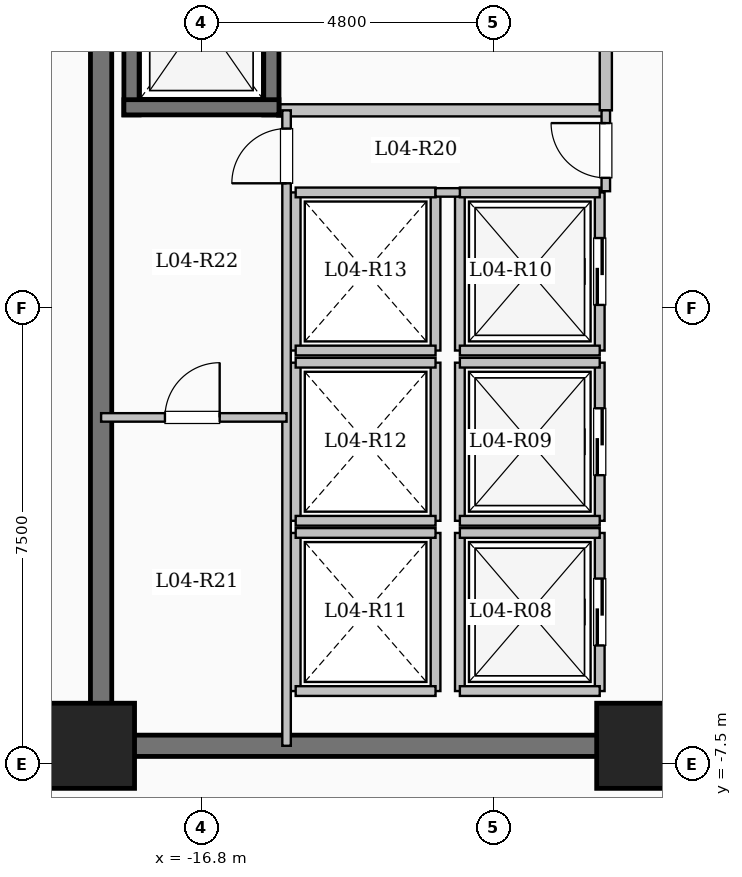
"""IFC4 building model, lengths in metres.
Left out: names, types, materials, properties, quantities, classifications, styles, units other than length and angle.
Written with IfcOpenShell. Run it as: python <this file> out.ifc"""

import sys

from ifc_helpers import new_model, si_unit, direction, frame, frame_2d, origin, origin_2d, place, context, subcontext, project, spatial, rectangle, extrude, element, fill, save


model = new_model("IFC4")
c1 = context("Model", 3, precision=1e-05, world=origin(), true_north=direction((0.0, 1.0)))
c2 = subcontext(c1, "Body", "Model", "MODEL_VIEW")
j1 = project(units=[si_unit("LENGTHUNIT", "METRE"), si_unit("PLANEANGLEUNIT", "RADIAN")], contexts=[c1])
p1 = place(None, origin())
s1 = spatial("IfcSite", under=j1, at=p1, CompositionType="ELEMENT")
p2 = place(p1, origin())
s2 = spatial("IfcBuilding", under=s1, at=p2, CompositionType="ELEMENT")
p3 = place(p2, frame((0.0, 0.0, 18.9)))
s3 = spatial("IfcBuildingStorey", under=s2, at=p3, CompositionType="ELEMENT", Elevation=18.9)
for number, where, z_axis, x_axis in (
    (1, (-9.6, -7.2, 0.0), (0.0, 0.0, 1.0), (1.0, 0.0, 0.0)),
    (2, (-18.6, -7.2, 0.0), (0.0, 0.0, 1.0), (1.0, 0.0, 0.0)),
):
    element("IfcColumn", number, at=place(p3, frame(where, z_axis=z_axis, x_axis=x_axis)), inside=s3, PredefinedType="COLUMN", context=c2, shape_type="SweptSolid", body=[
        extrude(rectangle(XDim=1.4, YDim=1.4, at=origin_2d()), origin(), (0.0, 0.0, 1.0), 5.1),
    ])
p4 = place(p3, frame((-15.55, 3.25, 0.0), z_axis=(0.0, 0.0, 1.0), x_axis=(1.0, 0.0, 0.0)))
e3 = element("IfcWall", 3, at=p4, inside=s3, PredefinedType="SOLIDWALL", context=c2, shape_type="SweptSolid", body=[
    extrude(rectangle(XDim=5.4, YDim=0.2, at=frame_2d((2.7, 0.0))), origin(), (0.0, 0.0, 1.0), 4.85),
])
p5 = place(p3, frame((-10.15, 3.25, 0.0), z_axis=(0.0, 0.0, 1.0), x_axis=(0.0, 1.0, 0.0)))
e4 = element("IfcWall", 4, at=p5, inside=s3, PredefinedType="SOLIDWALL", context=c2, shape_type="SweptSolid", body=[
    extrude(rectangle(XDim=3.25, YDim=0.2, at=frame_2d((1.625, 0.0))), origin(), (0.0, 0.0, 1.0), 4.85),
])
p6 = place(p5, frame((1.1, 0.0, 0.0)))
e5 = element("IfcOpeningElement", 5, at=p6, cuts=e4, PredefinedType="OPENING", context=c2, shape_type="SweptSolid", body=[
    extrude(rectangle(XDim=1.02, YDim=2.15, at=frame_2d((0.51, 1.075))), frame((0.0, 0.11, 0.0), z_axis=(0.0, -1.0, 0.0), x_axis=(1.0, 0.0, 0.0)), (0.0, 0.0, 1.0), 0.22),
])
p7 = place(p3, frame((-17.95, 3.175, 0.0), z_axis=(0.0, 0.0, 1.0), x_axis=(0.0, 1.0, 0.0)))
e6 = element("IfcWall", 6, at=p7, inside=s3, PredefinedType="SHEAR", context=c2, shape_type="SweptSolid", body=[
    extrude(rectangle(XDim=3.25, YDim=0.25, at=frame_2d((1.625, 0.0))), origin(), (0.0, 0.0, 1.0), 5.1),
])
p8 = place(p3, frame((-15.65, 3.175, 0.0), z_axis=(0.0, 0.0, 1.0), x_axis=(0.0, 1.0, 0.0)))
e7 = element("IfcWall", 7, at=p8, inside=s3, PredefinedType="SHEAR", context=c2, shape_type="SweptSolid", body=[
    extrude(rectangle(XDim=3.25, YDim=0.25, at=frame_2d((1.625, 0.0))), origin(), (0.0, 0.0, 1.0), 5.1),
])
p9 = place(p8, frame((1.075, 0.0, 0.0)))
e8 = element("IfcOpeningElement", 8, at=p9, cuts=e7, PredefinedType="OPENING", context=c2, shape_type="SweptSolid", body=[
    extrude(rectangle(XDim=1.1, YDim=2.15, at=frame_2d((0.55, 1.075))), frame((0.0, 0.135, 0.0), z_axis=(0.0, -1.0, 0.0), x_axis=(1.0, 0.0, 0.0)), (0.0, 0.0, 1.0), 0.27),
])
p10 = place(p3, frame((-18.075, 3.3, 0.0), z_axis=(0.0, 0.0, 1.0), x_axis=(1.0, 0.0, 0.0)))
e9 = element("IfcWall", 9, at=p10, inside=s3, PredefinedType="SHEAR", context=c2, shape_type="SweptSolid", body=[
    extrude(rectangle(XDim=2.55, YDim=0.25, at=frame_2d((1.275, 0.0))), origin(), (0.0, 0.0, 1.0), 5.1),
])
p11 = place(p3, frame((-12.55, -6.3, 0.0), z_axis=(0.0, 0.0, 1.0), x_axis=(0.0, 1.0, 0.0)))
e10 = element("IfcWall", 10, at=p11, inside=s3, PredefinedType="SOLIDWALL", context=c2, shape_type="SweptSolid", body=[
    extrude(rectangle(XDim=2.6, YDim=0.16, at=frame_2d((1.3, 0.0))), origin(), (0.0, 0.0, 1.0), 4.85),
])
p12 = place(p3, frame((-10.25, -6.3, 0.0), z_axis=(0.0, 0.0, 1.0), x_axis=(0.0, 1.0, 0.0)))
e11 = element("IfcWall", 11, at=p12, inside=s3, PredefinedType="SOLIDWALL", context=c2, shape_type="SweptSolid", body=[
    extrude(rectangle(XDim=2.6, YDim=0.16, at=frame_2d((1.3, 0.0))), origin(), (0.0, 0.0, 1.0), 4.85),
])
p13 = place(p12, frame((0.75, 0.0, 0.0)))
e12 = element("IfcOpeningElement", 12, at=p13, cuts=e11, PredefinedType="OPENING", context=c2, shape_type="SweptSolid", body=[
    extrude(rectangle(XDim=1.1, YDim=2.15, at=frame_2d((0.55, 1.075))), frame((0.0, 0.09, 0.0), z_axis=(0.0, -1.0, 0.0), x_axis=(1.0, 0.0, 0.0)), (0.0, 0.0, 1.0), 0.18),
])
for number, where, z_axis, x_axis in (
    (13, (-12.55, -6.3, 0.0), (0.0, 0.0, 1.0), (1.0, 0.0, 0.0)),
    (14, (-12.55, -3.7, 0.0), (0.0, 0.0, 1.0), (1.0, 0.0, 0.0)),
):
    element("IfcWall", number, at=place(p3, frame(where, z_axis=z_axis, x_axis=x_axis)), inside=s3, PredefinedType="SOLIDWALL", context=c2, shape_type="SweptSolid", body=[
        extrude(rectangle(XDim=2.3, YDim=0.16, at=frame_2d((1.15, 0.0))), origin(), (0.0, 0.0, 1.0), 4.85),
    ])
p14 = place(p3, frame((-12.55, -3.5, 0.0), z_axis=(0.0, 0.0, 1.0), x_axis=(0.0, 1.0, 0.0)))
e15 = element("IfcWall", 15, at=p14, inside=s3, PredefinedType="SOLIDWALL", context=c2, shape_type="SweptSolid", body=[
    extrude(rectangle(XDim=2.6, YDim=0.16, at=frame_2d((1.3, 0.0))), origin(), (0.0, 0.0, 1.0), 4.85),
])
p15 = place(p3, frame((-10.25, -3.5, 0.0), z_axis=(0.0, 0.0, 1.0), x_axis=(0.0, 1.0, 0.0)))
e16 = element("IfcWall", 16, at=p15, inside=s3, PredefinedType="SOLIDWALL", context=c2, shape_type="SweptSolid", body=[
    extrude(rectangle(XDim=2.6, YDim=0.16, at=frame_2d((1.3, 0.0))), origin(), (0.0, 0.0, 1.0), 4.85),
])
p16 = place(p15, frame((0.75, 0.0, 0.0)))
e17 = element("IfcOpeningElement", 17, at=p16, cuts=e16, PredefinedType="OPENING", context=c2, shape_type="SweptSolid", body=[
    extrude(rectangle(XDim=1.1, YDim=2.15, at=frame_2d((0.55, 1.075))), frame((0.0, 0.09, 0.0), z_axis=(0.0, -1.0, 0.0), x_axis=(1.0, 0.0, 0.0)), (0.0, 0.0, 1.0), 0.18),
])
for number, where, z_axis, x_axis in (
    (18, (-12.55, -3.5, 0.0), (0.0, 0.0, 1.0), (1.0, 0.0, 0.0)),
    (19, (-12.55, -0.9, 0.0), (0.0, 0.0, 1.0), (1.0, 0.0, 0.0)),
):
    element("IfcWall", number, at=place(p3, frame(where, z_axis=z_axis, x_axis=x_axis)), inside=s3, PredefinedType="SOLIDWALL", context=c2, shape_type="SweptSolid", body=[
        extrude(rectangle(XDim=2.3, YDim=0.16, at=frame_2d((1.15, 0.0))), origin(), (0.0, 0.0, 1.0), 4.85),
    ])
p17 = place(p3, frame((-12.55, -0.7, 0.0), z_axis=(0.0, 0.0, 1.0), x_axis=(0.0, 1.0, 0.0)))
e20 = element("IfcWall", 20, at=p17, inside=s3, PredefinedType="SOLIDWALL", context=c2, shape_type="SweptSolid", body=[
    extrude(rectangle(XDim=2.6, YDim=0.16, at=frame_2d((1.3, 0.0))), origin(), (0.0, 0.0, 1.0), 4.85),
])
p18 = place(p3, frame((-10.25, -0.7, 0.0), z_axis=(0.0, 0.0, 1.0), x_axis=(0.0, 1.0, 0.0)))
e21 = element("IfcWall", 21, at=p18, inside=s3, PredefinedType="SOLIDWALL", context=c2, shape_type="SweptSolid", body=[
    extrude(rectangle(XDim=2.6, YDim=0.16, at=frame_2d((1.3, 0.0))), origin(), (0.0, 0.0, 1.0), 4.85),
])
p19 = place(p18, frame((0.75, 0.0, 0.0)))
e22 = element("IfcOpeningElement", 22, at=p19, cuts=e21, PredefinedType="OPENING", context=c2, shape_type="SweptSolid", body=[
    extrude(rectangle(XDim=1.1, YDim=2.15, at=frame_2d((0.55, 1.075))), frame((0.0, 0.09, 0.0), z_axis=(0.0, -1.0, 0.0), x_axis=(1.0, 0.0, 0.0)), (0.0, 0.0, 1.0), 0.18),
])
for number, where, z_axis, x_axis in (
    (23, (-12.55, -0.7, 0.0), (0.0, 0.0, 1.0), (1.0, 0.0, 0.0)),
    (24, (-12.55, 1.9, 0.0), (0.0, 0.0, 1.0), (1.0, 0.0, 0.0)),
):
    element("IfcWall", number, at=place(p3, frame(where, z_axis=z_axis, x_axis=x_axis)), inside=s3, PredefinedType="SOLIDWALL", context=c2, shape_type="SweptSolid", body=[
        extrude(rectangle(XDim=2.3, YDim=0.16, at=frame_2d((1.15, 0.0))), origin(), (0.0, 0.0, 1.0), 4.85),
    ])
for number, where, z_axis, x_axis in (
    (25, (-15.25, -6.3, 0.0), (0.0, 0.0, 1.0), (0.0, 1.0, 0.0)),
    (26, (-12.95, -6.3, 0.0), (0.0, 0.0, 1.0), (0.0, 1.0, 0.0)),
):
    element("IfcWall", number, at=place(p3, frame(where, z_axis=z_axis, x_axis=x_axis)), inside=s3, PredefinedType="SOLIDWALL", context=c2, shape_type="SweptSolid", body=[
        extrude(rectangle(XDim=2.6, YDim=0.16, at=frame_2d((1.3, 0.0))), origin(), (0.0, 0.0, 1.0), 4.85),
    ])
for number, where, z_axis, x_axis in (
    (27, (-15.25, -6.3, 0.0), (0.0, 0.0, 1.0), (1.0, 0.0, 0.0)),
    (28, (-15.25, -3.7, 0.0), (0.0, 0.0, 1.0), (1.0, 0.0, 0.0)),
):
    element("IfcWall", number, at=place(p3, frame(where, z_axis=z_axis, x_axis=x_axis)), inside=s3, PredefinedType="SOLIDWALL", context=c2, shape_type="SweptSolid", body=[
        extrude(rectangle(XDim=2.3, YDim=0.16, at=frame_2d((1.15, 0.0))), origin(), (0.0, 0.0, 1.0), 4.85),
    ])
for number, where, z_axis, x_axis in (
    (29, (-15.25, -3.5, 0.0), (0.0, 0.0, 1.0), (0.0, 1.0, 0.0)),
    (30, (-12.95, -3.5, 0.0), (0.0, 0.0, 1.0), (0.0, 1.0, 0.0)),
):
    element("IfcWall", number, at=place(p3, frame(where, z_axis=z_axis, x_axis=x_axis)), inside=s3, PredefinedType="SOLIDWALL", context=c2, shape_type="SweptSolid", body=[
        extrude(rectangle(XDim=2.6, YDim=0.16, at=frame_2d((1.3, 0.0))), origin(), (0.0, 0.0, 1.0), 4.85),
    ])
for number, where, z_axis, x_axis in (
    (31, (-15.25, -3.5, 0.0), (0.0, 0.0, 1.0), (1.0, 0.0, 0.0)),
    (32, (-15.25, -0.9, 0.0), (0.0, 0.0, 1.0), (1.0, 0.0, 0.0)),
):
    element("IfcWall", number, at=place(p3, frame(where, z_axis=z_axis, x_axis=x_axis)), inside=s3, PredefinedType="SOLIDWALL", context=c2, shape_type="SweptSolid", body=[
        extrude(rectangle(XDim=2.3, YDim=0.16, at=frame_2d((1.15, 0.0))), origin(), (0.0, 0.0, 1.0), 4.85),
    ])
for number, where, z_axis, x_axis in (
    (33, (-15.25, -0.7, 0.0), (0.0, 0.0, 1.0), (0.0, 1.0, 0.0)),
    (34, (-12.95, -0.7, 0.0), (0.0, 0.0, 1.0), (0.0, 1.0, 0.0)),
):
    element("IfcWall", number, at=place(p3, frame(where, z_axis=z_axis, x_axis=x_axis)), inside=s3, PredefinedType="SOLIDWALL", context=c2, shape_type="SweptSolid", body=[
        extrude(rectangle(XDim=2.6, YDim=0.16, at=frame_2d((1.3, 0.0))), origin(), (0.0, 0.0, 1.0), 4.85),
    ])
for number, where, z_axis, x_axis in (
    (35, (-15.25, -0.7, 0.0), (0.0, 0.0, 1.0), (1.0, 0.0, 0.0)),
    (36, (-15.25, 1.9, 0.0), (0.0, 0.0, 1.0), (1.0, 0.0, 0.0)),
):
    element("IfcWall", number, at=place(p3, frame(where, z_axis=z_axis, x_axis=x_axis)), inside=s3, PredefinedType="SOLIDWALL", context=c2, shape_type="SweptSolid", body=[
        extrude(rectangle(XDim=2.3, YDim=0.16, at=frame_2d((1.15, 0.0))), origin(), (0.0, 0.0, 1.0), 4.85),
    ])
p20 = place(p3, frame((-18.45, -7.375, 0.0), z_axis=(0.0, 0.0, 1.0), x_axis=(0.0, 1.0, 0.0)))
e37 = element("IfcWall", 37, at=p20, inside=s3, PredefinedType="SHEAR", context=c2, shape_type="SweptSolid", body=[
    extrude(rectangle(XDim=14.05, YDim=0.35, at=frame_2d((7.025, 0.0))), origin(), (0.0, 0.0, 1.0), 5.1),
])
p21 = place(p3, frame((-18.625, -7.2, 0.0), z_axis=(0.0, 0.0, 1.0), x_axis=(1.0, 0.0, 0.0)))
e38 = element("IfcWall", 38, at=p21, inside=s3, PredefinedType="SHEAR", context=c2, shape_type="SweptSolid", body=[
    extrude(rectangle(XDim=8.55, YDim=0.35, at=frame_2d((4.275, 0.0))), origin(), (0.0, 0.0, 1.0), 5.1),
])
p22 = place(p3, frame((-12.95, 1.9, 0.0), z_axis=(0.0, 0.0, 1.0), x_axis=(1.0, 0.0, 0.0)))
e39 = element("IfcWall", 39, at=p22, inside=s3, PredefinedType="PARTITIONING", context=c2, shape_type="SweptSolid", body=[
    extrude(rectangle(XDim=0.4, YDim=0.14, at=frame_2d((0.2, 0.0))), origin(), (0.0, 0.0, 1.0), 4.85),
])
p23 = place(p3, frame((-10.15, 1.92, 0.0), z_axis=(0.0, 0.0, 1.0), x_axis=(0.0, 1.0, 0.0)))
e40 = element("IfcWall", 40, at=p23, inside=s3, PredefinedType="PARTITIONING", context=c2, shape_type="SweptSolid", body=[
    extrude(rectangle(XDim=1.33, YDim=0.14, at=frame_2d((0.665, 0.0))), origin(), (0.0, 0.0, 1.0), 4.85),
])
p24 = place(p23, frame((0.22, 0.0, 0.0)))
e41 = element("IfcOpeningElement", 41, at=p24, cuts=e40, PredefinedType="OPENING", context=c2, shape_type="SweptSolid", body=[
    extrude(rectangle(XDim=0.9, YDim=2.08, at=frame_2d((0.45, 1.04))), frame((0.0, 0.08, 0.0), z_axis=(0.0, -1.0, 0.0), x_axis=(1.0, 0.0, 0.0)), (0.0, 0.0, 1.0), 0.16),
])
p25 = place(p3, frame((-15.4, -7.2, 0.0), z_axis=(0.0, 0.0, 1.0), x_axis=(0.0, 1.0, 0.0)))
e42 = element("IfcWall", 42, at=p25, inside=s3, PredefinedType="PARTITIONING", context=c2, shape_type="SweptSolid", body=[
    extrude(rectangle(XDim=10.45, YDim=0.14, at=frame_2d((5.225, 0.0))), origin(), (0.0, 0.0, 1.0), 4.85),
])
p26 = place(p25, frame((9.25, 0.0, 0.0)))
e43 = element("IfcOpeningElement", 43, at=p26, cuts=e42, PredefinedType="OPENING", context=c2, shape_type="SweptSolid", body=[
    extrude(rectangle(XDim=0.9, YDim=2.08, at=frame_2d((0.45, 1.04))), frame((0.0, 0.08, 0.0), z_axis=(0.0, -1.0, 0.0), x_axis=(1.0, 0.0, 0.0)), (0.0, 0.0, 1.0), 0.16),
])
p27 = place(p3, frame((-18.45, -1.8, 0.0), z_axis=(0.0, 0.0, 1.0), x_axis=(1.0, 0.0, 0.0)))
e44 = element("IfcWall", 44, at=p27, inside=s3, PredefinedType="PARTITIONING", context=c2, shape_type="SweptSolid", body=[
    extrude(rectangle(XDim=3.05, YDim=0.14, at=frame_2d((1.525, 0.0))), origin(), (0.0, 0.0, 1.0), 4.85),
])
p28 = place(p27, frame((1.05, 0.0, 0.0)))
e45 = element("IfcOpeningElement", 45, at=p28, cuts=e44, PredefinedType="OPENING", context=c2, shape_type="SweptSolid", body=[
    extrude(rectangle(XDim=0.9, YDim=2.08, at=frame_2d((0.45, 1.04))), frame((0.0, 0.08, 0.0), z_axis=(0.0, -1.0, 0.0), x_axis=(1.0, 0.0, 0.0)), (0.0, 0.0, 1.0), 0.16),
])
p29 = place(p3, frame((-28.88, -7.25, 0.0), z_axis=(0.0, 0.0, 1.0), x_axis=(1.0, 0.0, 0.0)))
e46 = element("IfcWall", 46, at=p29, inside=s3, PredefinedType="PARTITIONING", context=c2, shape_type="SweptSolid", body=[
    extrude(rectangle(XDim=10.43, YDim=0.15, at=frame_2d((5.215, 0.0))), origin(), (0.0, 0.0, 1.0), 4.85),
])
p30 = place(p29, frame((2.5, 0.0, 0.0)))
e47 = element("IfcOpeningElement", 47, at=p30, cuts=e46, PredefinedType="OPENING", context=c2, shape_type="SweptSolid", body=[
    extrude(rectangle(XDim=1.08, YDim=2.15, at=frame_2d((0.54, 1.075))), frame((0.0, 0.085, 0.0), z_axis=(0.0, -1.0, 0.0), x_axis=(1.0, 0.0, 0.0)), (0.0, 0.0, 1.0), 0.17),
])
p31 = place(p13, origin())
e48 = element("IfcDoor", 48, at=p31, inside=s3, OperationType="SLIDING_TO_LEFT", PredefinedType="DOOR", context=c2, shape_type="SweptSolid", body=[
    extrude(rectangle(XDim=1.1, YDim=2.15, at=frame_2d((0.55, 1.075))), frame((0.0, 0.025, 0.0), z_axis=(0.0, -1.0, 0.0), x_axis=(1.0, 0.0, 0.0)), (0.0, 0.0, 1.0), 0.05),
])
fill(e12, e48)
p32 = place(p16, origin())
e49 = element("IfcDoor", 49, at=p32, inside=s3, OperationType="SLIDING_TO_LEFT", PredefinedType="DOOR", context=c2, shape_type="SweptSolid", body=[
    extrude(rectangle(XDim=1.1, YDim=2.15, at=frame_2d((0.55, 1.075))), frame((0.0, 0.025, 0.0), z_axis=(0.0, -1.0, 0.0), x_axis=(1.0, 0.0, 0.0)), (0.0, 0.0, 1.0), 0.05),
])
fill(e17, e49)
p33 = place(p19, origin())
e50 = element("IfcDoor", 50, at=p33, inside=s3, OperationType="SLIDING_TO_LEFT", PredefinedType="DOOR", context=c2, shape_type="SweptSolid", body=[
    extrude(rectangle(XDim=1.1, YDim=2.15, at=frame_2d((0.55, 1.075))), frame((0.0, 0.025, 0.0), z_axis=(0.0, -1.0, 0.0), x_axis=(1.0, 0.0, 0.0)), (0.0, 0.0, 1.0), 0.05),
])
fill(e22, e50)
p34 = place(p24, origin())
e51 = element("IfcDoor", 51, at=p34, inside=s3, OperationType="SINGLE_SWING_RIGHT", PredefinedType="DOOR", context=c2, shape_type="SweptSolid", body=[
    extrude(rectangle(XDim=0.9, YDim=2.08, at=frame_2d((0.45, 1.04))), frame((0.0, 0.025, 0.0), z_axis=(0.0, -1.0, 0.0), x_axis=(1.0, 0.0, 0.0)), (0.0, 0.0, 1.0), 0.05),
])
fill(e41, e51)
p35 = place(p26, origin())
e52 = element("IfcDoor", 52, at=p35, inside=s3, OperationType="SINGLE_SWING_LEFT", PredefinedType="DOOR", context=c2, shape_type="SweptSolid", body=[
    extrude(rectangle(XDim=0.9, YDim=2.08, at=frame_2d((0.45, 1.04))), frame((0.0, 0.025, 0.0), z_axis=(0.0, -1.0, 0.0), x_axis=(1.0, 0.0, 0.0)), (0.0, 0.0, 1.0), 0.05),
])
fill(e43, e52)
p36 = place(p28, origin())
e53 = element("IfcDoor", 53, at=p36, inside=s3, OperationType="SINGLE_SWING_RIGHT", PredefinedType="DOOR", context=c2, shape_type="SweptSolid", body=[
    extrude(rectangle(XDim=0.9, YDim=2.08, at=frame_2d((0.45, 1.04))), frame((0.0, 0.025, 0.0), z_axis=(0.0, -1.0, 0.0), x_axis=(1.0, 0.0, 0.0)), (0.0, 0.0, 1.0), 0.05),
])
fill(e45, e53)
save(model, sys.argv[1])
